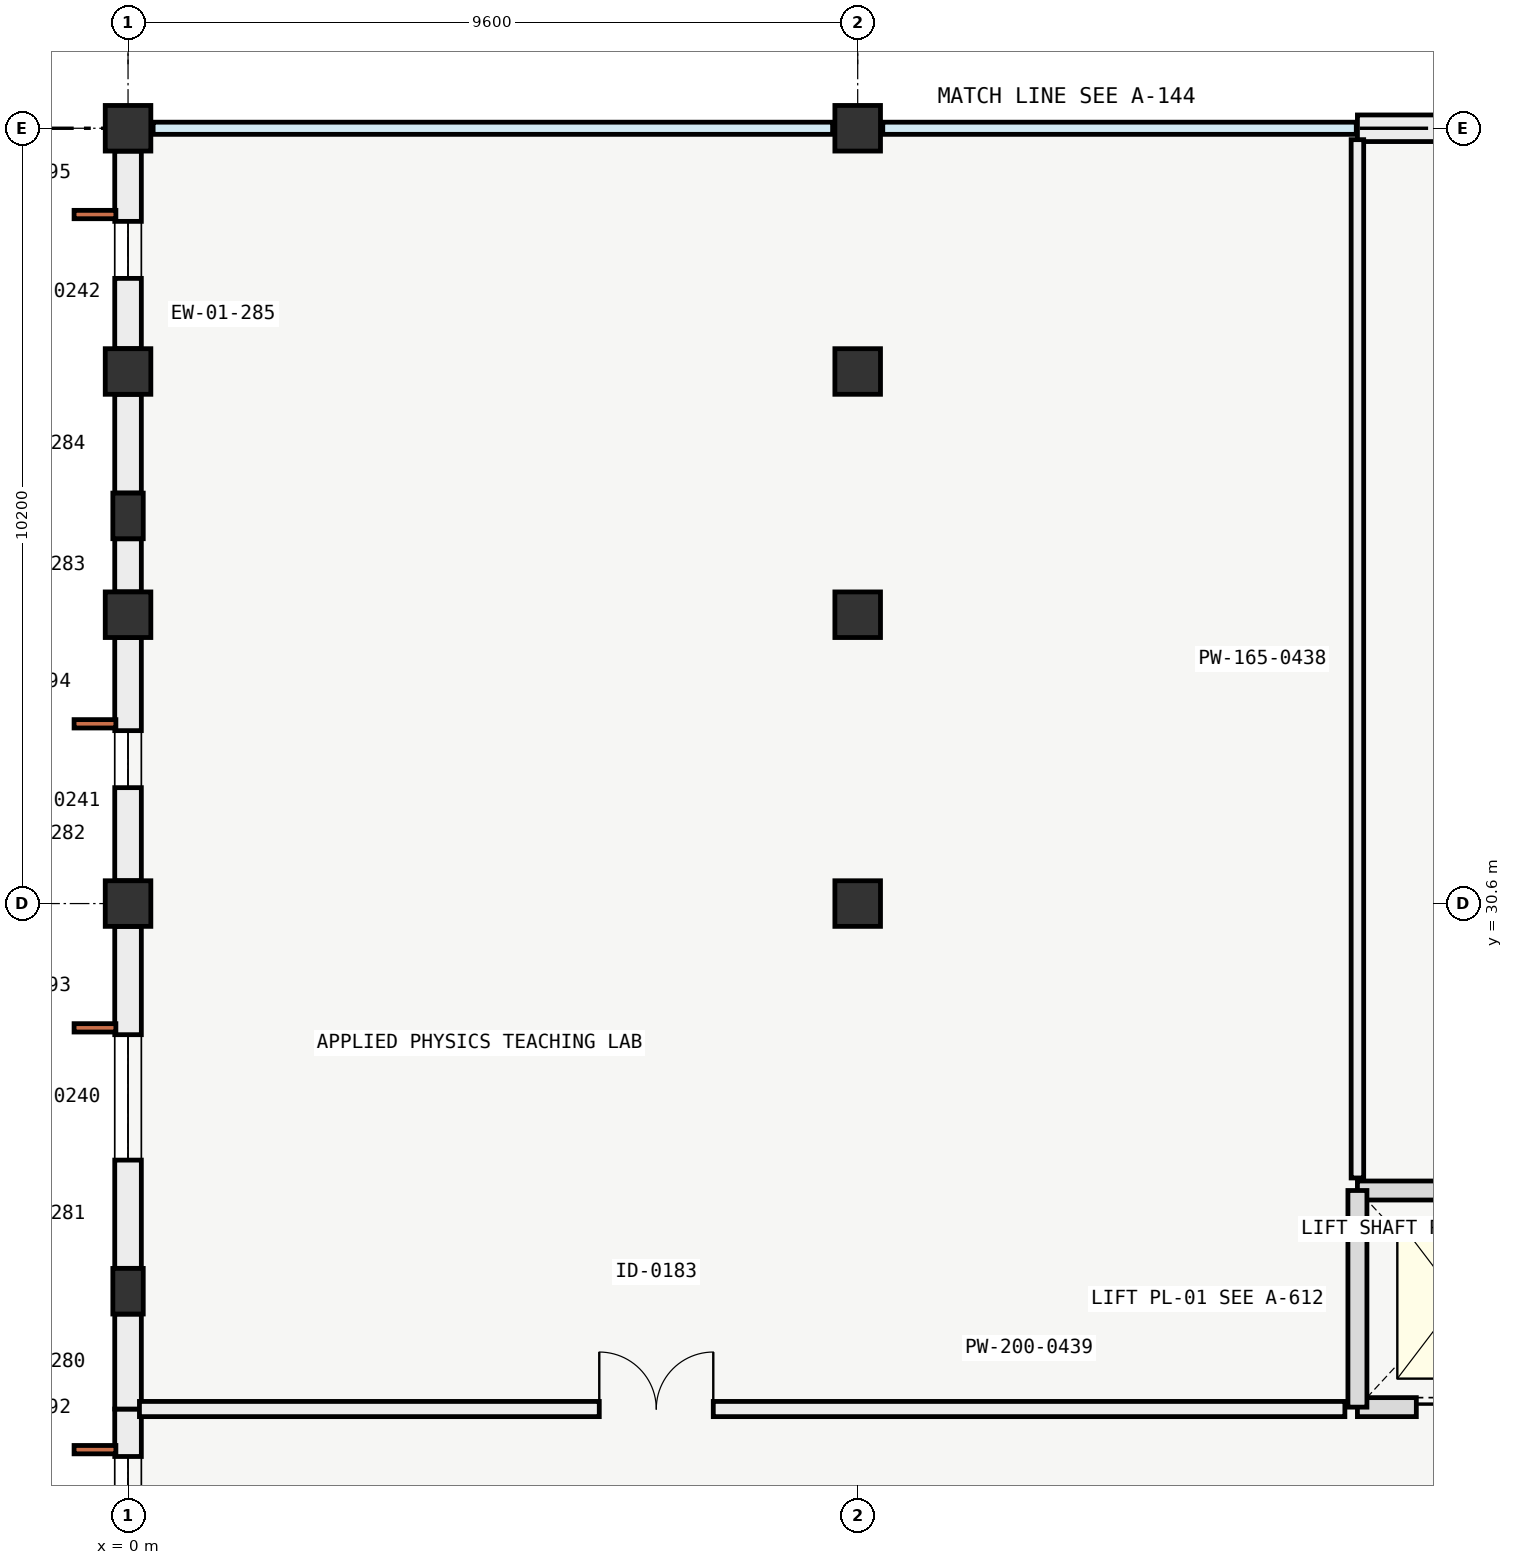
"""IFC4 building model, lengths in metres.
Left out: names, types, materials, properties, quantities, classifications, styles, units other than length and angle.
Written with IfcOpenShell. Run it as: python <this file> out.ifc"""

import sys

from ifc_helpers import new_model, si_unit, direction, frame, frame_2d, origin, origin_2d, place, context, subcontext, project, spatial, rectangle, extrude, element, fill, save


model = new_model("IFC4")
c1 = context("Model", 3, precision=1e-05, world=origin(), true_north=direction((0.0, 1.0)))
c2 = subcontext(c1, "Body", "Model", "MODEL_VIEW")
j1 = project(units=[si_unit("LENGTHUNIT", "METRE"), si_unit("PLANEANGLEUNIT", "RADIAN")], contexts=[c1])
p1 = place(None, origin())
s1 = spatial("IfcSite", under=j1, at=p1, CompositionType="ELEMENT")
p2 = place(p1, origin())
s2 = spatial("IfcBuilding", under=s1, at=p2, CompositionType="ELEMENT")
p3 = place(p2, frame((0.0, 0.0, 18.0)))
s3 = spatial("IfcBuildingStorey", under=s2, at=p3, CompositionType="ELEMENT", Elevation=18.0)
for number, where, z_axis, x_axis in (
    (1, (0.0, 30.6, 0.0), (0.0, 0.0, 1.0), (1.0, 0.0, 0.0)),
    (2, (0.0, 34.4, 0.0), (0.0, 0.0, 1.0), (1.0, 0.0, 0.0)),
    (3, (0.0, 37.6, 0.0), (0.0, 0.0, 1.0), (1.0, 0.0, 0.0)),
    (4, (0.0, 40.8, 0.0), (0.0, 0.0, 1.0), (1.0, 0.0, 0.0)),
    (5, (9.6, 30.6, 0.0), (0.0, 0.0, 1.0), (1.0, 0.0, 0.0)),
    (6, (9.6, 34.4, 0.0), (0.0, 0.0, 1.0), (1.0, 0.0, 0.0)),
    (7, (9.6, 37.6, 0.0), (0.0, 0.0, 1.0), (1.0, 0.0, 0.0)),
    (8, (9.6, 40.8, 0.0), (0.0, 0.0, 1.0), (1.0, 0.0, 0.0)),
):
    element("IfcColumn", number, at=place(p3, frame(where, z_axis=z_axis, x_axis=x_axis)), inside=s3, PredefinedType="COLUMN", context=c2, shape_type="SweptSolid", body=[
        extrude(rectangle(XDim=0.6, YDim=0.6, at=origin_2d()), origin(), (0.0, 0.0, 1.0), 4.2),
    ])
for number, where, z_axis, x_axis in (
    (9, (0.0, 25.5, 0.0), (0.0, 0.0, 1.0), (1.0, 0.0, 0.0)),
    (10, (0.0, 35.7, 0.0), (0.0, 0.0, 1.0), (1.0, 0.0, 0.0)),
):
    element("IfcColumn", number, at=place(p3, frame(where, z_axis=z_axis, x_axis=x_axis)), inside=s3, PredefinedType="PILASTER", context=c2, shape_type="SweptSolid", body=[
        extrude(rectangle(XDim=0.4, YDim=0.6, at=origin_2d()), origin(), (0.0, 0.0, 1.0), 4.2),
    ])
p4 = place(p3, frame((0.0, 20.701, 0.0), z_axis=(0.0, 0.0, 1.0), x_axis=(0.0, 1.0, 0.0)))
e11 = element("IfcWall", 11, at=p4, inside=s3, PredefinedType="SOLIDWALL", context=c2, shape_type="SweptSolid", body=[
    extrude(rectangle(XDim=3.249, YDim=0.35, at=frame_2d((1.625, 0.0))), origin(), (0.0, 0.0, 1.0), 3.25),
])
p5 = place(p4, frame((0.625, 0.0, 0.75)))
e12 = element("IfcOpeningElement", 12, at=p5, cuts=e11, PredefinedType="OPENING", context=c2, shape_type="SweptSolid", body=[
    extrude(rectangle(XDim=2.0, YDim=1.35, at=frame_2d((1.0, 0.675))), frame((0.0, 0.185, 0.0), z_axis=(0.0, -1.0, 0.0), x_axis=(1.0, 0.0, 0.0)), (0.0, 0.0, 1.0), 0.37),
])
p6 = place(p3, frame((0.0, 23.95, 0.0), z_axis=(0.0, 0.0, 1.0), x_axis=(0.0, 1.0, 0.0)))
e13 = element("IfcWall", 13, at=p6, inside=s3, PredefinedType="SOLIDWALL", context=c2, shape_type="SweptSolid", body=[
    extrude(rectangle(XDim=1.249, YDim=0.35, at=frame_2d((0.625, 0.0))), origin(), (0.0, 0.0, 1.0), 3.25),
])
p7 = place(p3, frame((0.0, 25.801, 0.0), z_axis=(0.0, 0.0, 1.0), x_axis=(0.0, 1.0, 0.0)))
e14 = element("IfcWall", 14, at=p7, inside=s3, PredefinedType="SOLIDWALL", context=c2, shape_type="SweptSolid", body=[
    extrude(rectangle(XDim=4.498, YDim=0.35, at=frame_2d((2.249, 0.0))), origin(), (0.0, 0.0, 1.0), 3.25),
])
p8 = place(p7, frame((1.424, 0.0, 0.85)))
e15 = element("IfcOpeningElement", 15, at=p8, cuts=e14, PredefinedType="OPENING", context=c2, shape_type="SweptSolid", body=[
    extrude(rectangle(XDim=1.65, YDim=2.0, at=frame_2d((0.825, 1.0))), frame((0.0, 0.185, 0.0), z_axis=(0.0, -1.0, 0.0), x_axis=(1.0, 0.0, 0.0)), (0.0, 0.0, 1.0), 0.37),
])
p9 = place(p3, frame((0.0, 30.901, 0.0), z_axis=(0.0, 0.0, 1.0), x_axis=(0.0, 1.0, 0.0)))
e16 = element("IfcWall", 16, at=p9, inside=s3, PredefinedType="SOLIDWALL", context=c2, shape_type="SweptSolid", body=[
    extrude(rectangle(XDim=3.198, YDim=0.35, at=frame_2d((1.599, 0.0))), origin(), (0.0, 0.0, 1.0), 2.33),
])
p10 = place(p9, frame((1.224, 0.0, 0.85)))
e17 = element("IfcOpeningElement", 17, at=p10, cuts=e16, PredefinedType="OPENING", context=c2, shape_type="SweptSolid", body=[
    extrude(rectangle(XDim=0.75, YDim=1.1, at=frame_2d((0.375, 0.55))), frame((0.0, 0.185, 0.0), z_axis=(0.0, -1.0, 0.0), x_axis=(1.0, 0.0, 0.0)), (0.0, 0.0, 1.0), 0.37),
])
p11 = place(p3, frame((0.0, 34.701, 0.0), z_axis=(0.0, 0.0, 1.0), x_axis=(0.0, 1.0, 0.0)))
e18 = element("IfcWall", 18, at=p11, inside=s3, PredefinedType="SOLIDWALL", context=c2, shape_type="SweptSolid", body=[
    extrude(rectangle(XDim=0.698, YDim=0.35, at=frame_2d((0.349, 0.0))), origin(), (0.0, 0.0, 1.0), 2.33),
])
p12 = place(p3, frame((0.0, 36.001, 0.0), z_axis=(0.0, 0.0, 1.0), x_axis=(0.0, 1.0, 0.0)))
e19 = element("IfcWall", 19, at=p12, inside=s3, PredefinedType="SOLIDWALL", context=c2, shape_type="SweptSolid", body=[
    extrude(rectangle(XDim=1.298, YDim=0.35, at=frame_2d((0.649, 0.0))), origin(), (0.0, 0.0, 1.0), 2.33),
])
p13 = place(p3, frame((0.0, 37.901, 0.0), z_axis=(0.0, 0.0, 1.0), x_axis=(0.0, 1.0, 0.0)))
e20 = element("IfcWall", 20, at=p13, inside=s3, PredefinedType="SOLIDWALL", context=c2, shape_type="SweptSolid", body=[
    extrude(rectangle(XDim=2.598, YDim=0.35, at=frame_2d((1.299, 0.0))), origin(), (0.0, 0.0, 1.0), 2.33),
])
p14 = place(p13, frame((0.924, 0.0, 0.85)))
e21 = element("IfcOpeningElement", 21, at=p14, cuts=e20, PredefinedType="OPENING", context=c2, shape_type="SweptSolid", body=[
    extrude(rectangle(XDim=0.75, YDim=1.1, at=frame_2d((0.375, 0.55))), frame((0.0, 0.185, 0.0), z_axis=(0.0, -1.0, 0.0), x_axis=(1.0, 0.0, 0.0)), (0.0, 0.0, 1.0), 0.37),
])
p15 = place(p3, frame((16.175, 40.8, 0.0), z_axis=(0.0, 0.0, 1.0), x_axis=(1.0, 0.0, 0.0)))
e22 = element("IfcWall", 22, at=p15, inside=s3, PredefinedType="SOLIDWALL", context=c2, shape_type="SweptSolid", body=[
    extrude(rectangle(XDim=2.724, YDim=0.35, at=frame_2d((1.362, 0.0))), origin(), (0.0, 0.0, 1.0), 2.33),
])
p16 = place(p3, frame((16.175, 23.975, 0.0), z_axis=(0.0, 0.0, 1.0), x_axis=(1.0, 0.0, 0.0)))
e23 = element("IfcWall", 23, at=p16, inside=s3, PredefinedType="SOLIDWALL", context=c2, shape_type="SweptSolid", body=[
    extrude(rectangle(XDim=2.65, YDim=0.25, at=frame_2d((1.325, 0.0))), origin(), (0.0, 0.0, 1.0), 3.95),
])
p17 = place(p16, frame((0.775, 0.0, 0.0)))
e24 = element("IfcOpeningElement", 24, at=p17, cuts=e23, PredefinedType="OPENING", context=c2, shape_type="SweptSolid", body=[
    extrude(rectangle(XDim=1.1, YDim=2.1, at=frame_2d((0.55, 1.05))), frame((0.0, 0.135, 0.0), z_axis=(0.0, -1.0, 0.0), x_axis=(1.0, 0.0, 0.0)), (0.0, 0.0, 1.0), 0.27),
])
p18 = place(p3, frame((18.825, 26.825, 0.0), z_axis=(0.0, 0.0, 1.0), x_axis=(-1.0, 0.0, 0.0)))
e25 = element("IfcWall", 25, at=p18, inside=s3, PredefinedType="SOLIDWALL", context=c2, shape_type="SweptSolid", body=[
    extrude(rectangle(XDim=2.65, YDim=0.25, at=frame_2d((1.325, 0.0))), origin(), (0.0, 0.0, 1.0), 3.95),
])
p19 = place(p3, frame((16.175, 26.825, 0.0), z_axis=(0.0, 0.0, 1.0), x_axis=(0.0, -1.0, 0.0)))
e26 = element("IfcWall", 26, at=p19, inside=s3, PredefinedType="SOLIDWALL", context=c2, shape_type="SweptSolid", body=[
    extrude(rectangle(XDim=2.85, YDim=0.25, at=frame_2d((1.425, 0.0))), origin(), (0.0, 0.0, 1.0), 3.95),
])
p20 = place(p3, frame((16.175, 26.99, 0.0), z_axis=(0.0, 0.0, 1.0), x_axis=(0.0, 1.0, 0.0)))
e27 = element("IfcWall", 27, at=p20, inside=s3, PredefinedType="PARTITIONING", context=c2, shape_type="SweptSolid", body=[
    extrude(rectangle(XDim=13.66, YDim=0.165, at=frame_2d((6.83, 0.0))), origin(), (0.0, 0.0, 1.0), 3.28),
])
p21 = place(p3, frame((0.15, 23.95, 0.0), z_axis=(0.0, 0.0, 1.0), x_axis=(1.0, 0.0, 0.0)))
e28 = element("IfcWall", 28, at=p21, inside=s3, PredefinedType="PARTITIONING", context=c2, shape_type="SweptSolid", body=[
    extrude(rectangle(XDim=15.86, YDim=0.2, at=frame_2d((7.93, 0.0))), origin(), (0.0, 0.0, 1.0), 3.28),
])
p22 = place(p21, frame((6.05, 0.0, 0.0)))
e29 = element("IfcOpeningElement", 29, at=p22, cuts=e28, PredefinedType="OPENING", context=c2, shape_type="SweptSolid", body=[
    extrude(rectangle(XDim=1.5, YDim=2.2, at=frame_2d((0.75, 1.1))), frame((0.0, 0.11, 0.0), z_axis=(0.0, -1.0, 0.0), x_axis=(1.0, 0.0, 0.0)), (0.0, 0.0, 1.0), 0.22),
])
p23 = place(p5, origin())
e30 = element("IfcWindow", 30, at=p23, inside=s3, PartitioningType="SINGLE_PANEL", PredefinedType="WINDOW", context=c2, shape_type="SweptSolid", body=[
    extrude(rectangle(XDim=2.0, YDim=1.35, at=frame_2d((1.0, 0.675))), frame((0.0, 0.03, 0.0), z_axis=(0.0, -1.0, 0.0), x_axis=(1.0, 0.0, 0.0)), (0.0, 0.0, 1.0), 0.06),
])
fill(e12, e30)
p24 = place(p8, origin())
e31 = element("IfcWindow", 31, at=p24, inside=s3, PartitioningType="SINGLE_PANEL", PredefinedType="WINDOW", context=c2, shape_type="SweptSolid", body=[
    extrude(rectangle(XDim=1.65, YDim=2.0, at=frame_2d((0.825, 1.0))), frame((0.0, 0.03, 0.0), z_axis=(0.0, -1.0, 0.0), x_axis=(1.0, 0.0, 0.0)), (0.0, 0.0, 1.0), 0.06),
])
fill(e15, e31)
p25 = place(p10, origin())
e32 = element("IfcWindow", 32, at=p25, inside=s3, PartitioningType="SINGLE_PANEL", PredefinedType="WINDOW", context=c2, shape_type="SweptSolid", body=[
    extrude(rectangle(XDim=0.75, YDim=1.1, at=frame_2d((0.375, 0.55))), frame((0.0, 0.03, 0.0), z_axis=(0.0, -1.0, 0.0), x_axis=(1.0, 0.0, 0.0)), (0.0, 0.0, 1.0), 0.06),
])
fill(e17, e32)
p26 = place(p14, origin())
e33 = element("IfcWindow", 33, at=p26, inside=s3, PartitioningType="SINGLE_PANEL", PredefinedType="WINDOW", context=c2, shape_type="SweptSolid", body=[
    extrude(rectangle(XDim=0.75, YDim=1.1, at=frame_2d((0.375, 0.55))), frame((0.0, 0.03, 0.0), z_axis=(0.0, -1.0, 0.0), x_axis=(1.0, 0.0, 0.0)), (0.0, 0.0, 1.0), 0.06),
])
fill(e21, e33)
p27 = place(p17, origin())
e34 = element("IfcDoor", 34, at=p27, inside=s3, OperationType="SLIDING_TO_LEFT", PredefinedType="DOOR", context=c2, shape_type="SweptSolid", body=[
    extrude(rectangle(XDim=1.1, YDim=2.1, at=frame_2d((0.55, 1.05))), frame((0.0, 0.025, 0.0), z_axis=(0.0, -1.0, 0.0), x_axis=(1.0, 0.0, 0.0)), (0.0, 0.0, 1.0), 0.05),
])
fill(e24, e34)
p28 = place(p22, origin())
e35 = element("IfcDoor", 35, at=p28, inside=s3, OperationType="DOUBLE_DOOR_SINGLE_SWING", PredefinedType="DOOR", context=c2, shape_type="SweptSolid", body=[
    extrude(rectangle(XDim=1.5, YDim=2.2, at=frame_2d((0.75, 1.1))), frame((0.0, 0.025, 0.0), z_axis=(0.0, -1.0, 0.0), x_axis=(1.0, 0.0, 0.0)), (0.0, 0.0, 1.0), 0.05),
])
fill(e29, e35)
save(model, sys.argv[1])
